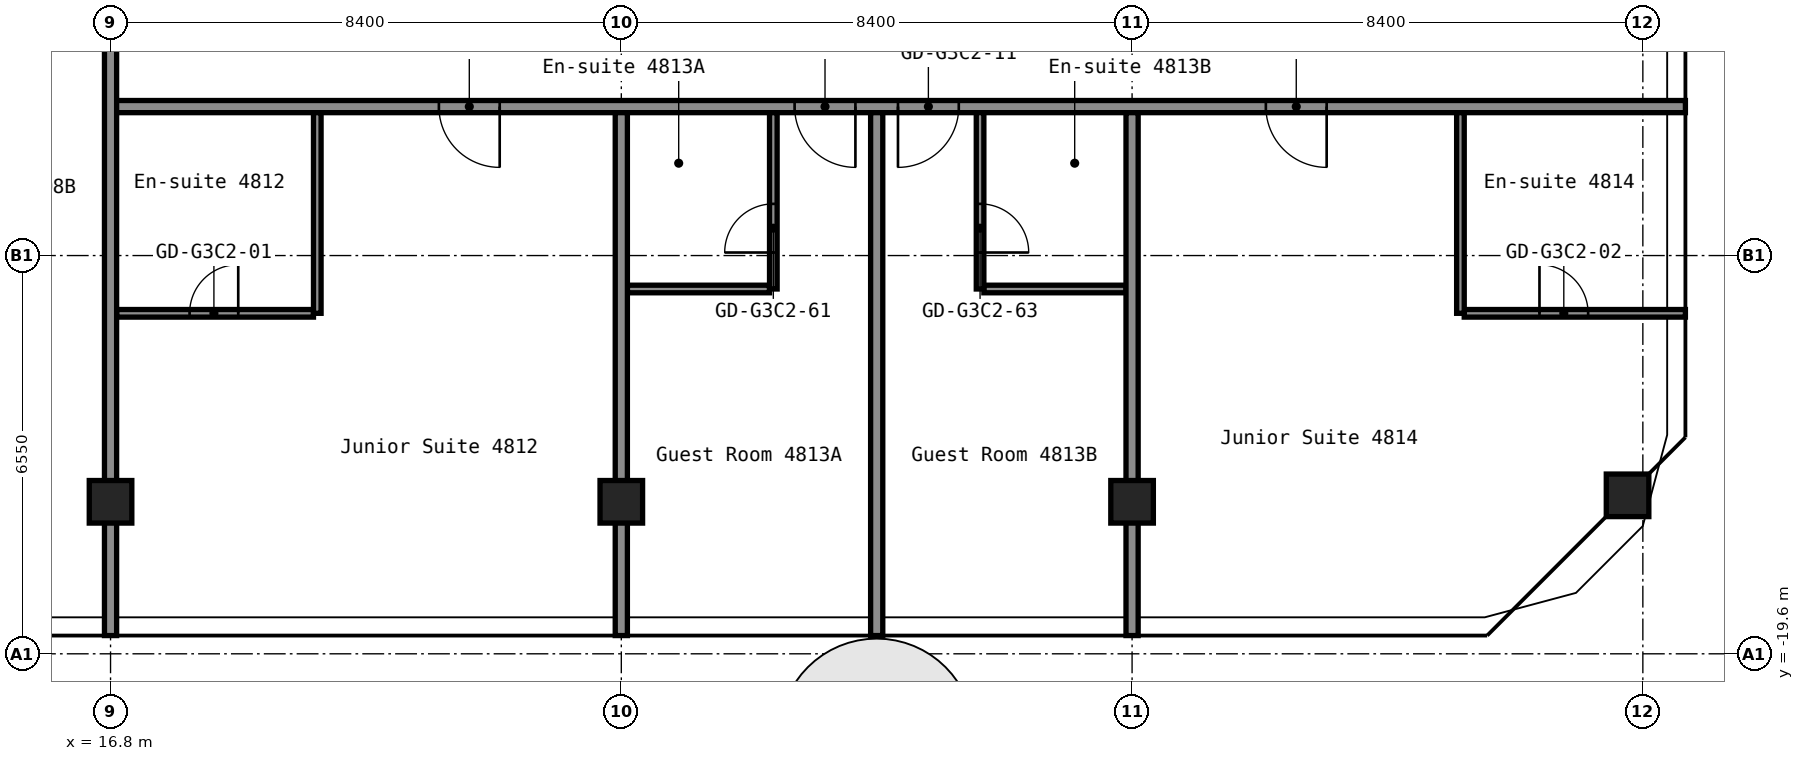
"""IFC4 building model, lengths in metres.
Left out: names, types, materials, properties, quantities, classifications, styles, units other than length and angle.
Written with IfcOpenShell. Run it as: python <this file> out.ifc"""

import sys

from ifc_helpers import new_model, si_unit, direction, frame, frame_2d, origin, origin_2d, place, context, subcontext, project, spatial, rectangle, hollow_rectangle, extrude, element, fill, save


model = new_model("IFC4")
c1 = context("Model", 3, precision=1e-05, world=origin(), true_north=direction((0.0, 1.0)))
c2 = subcontext(c1, "Body", "Model", "MODEL_VIEW")
j1 = project(units=[si_unit("LENGTHUNIT", "METRE"), si_unit("PLANEANGLEUNIT", "RADIAN")], contexts=[c1])
p1 = place(None, origin())
s1 = spatial("IfcSite", under=j1, at=p1, CompositionType="ELEMENT")
p2 = place(p1, origin())
s2 = spatial("IfcBuilding", under=s1, at=p2, CompositionType="ELEMENT")
p3 = place(p2, frame((0.0, 0.0, 169.4)))
s3 = spatial("IfcBuildingStorey", under=s2, at=p3, CompositionType="ELEMENT", Elevation=169.4)
for number, where, z_axis, x_axis in (
    (1, (16.8, -17.1, 0.0), (0.0, 0.0, 1.0), (1.0, 0.0, 0.0)),
    (2, (25.2, -17.1, 0.0), (0.0, 0.0, 1.0), (1.0, 0.0, 0.0)),
    (3, (33.6, -17.1, 0.0), (0.0, 0.0, 1.0), (1.0, 0.0, 0.0)),
    (4, (41.749, -16.994, 0.0), (0.0, 0.0, 1.0), (1.0, 0.0, 0.0)),
):
    element("IfcColumn", number, at=place(p3, frame(where, z_axis=z_axis, x_axis=x_axis)), inside=s3, PredefinedType="COLUMN", context=c2, shape_type="SweptSolid", body=[
        extrude(hollow_rectangle(XDim=0.7, YDim=0.7, WallThickness=0.028, at=origin_2d()), origin(), (0.0, 0.0, 1.0), 2.75),
    ])
p4 = place(p3, frame((16.9, -14.0, 0.0), z_axis=(0.0, 0.0, 1.0), x_axis=(1.0, 0.0, 0.0)))
e5 = element("IfcWall", 5, at=p4, inside=s3, PredefinedType="PARTITIONING", context=c2, shape_type="SweptSolid", body=[
    extrude(rectangle(XDim=3.238, YDim=0.125, at=frame_2d((1.619, 0.0))), origin(), (0.0, 0.0, 1.0), 2.75),
])
p5 = place(p4, frame((1.2, 0.0, 0.0)))
e6 = element("IfcOpeningElement", 6, at=p5, cuts=e5, PredefinedType="OPENING", context=c2, shape_type="SweptSolid", body=[
    extrude(rectangle(XDim=0.8, YDim=2.1, at=frame_2d((0.4, 1.05))), frame((0.0, 0.073, 0.0), z_axis=(0.0, -1.0, 0.0), x_axis=(1.0, 0.0, 0.0)), (0.0, 0.0, 1.0), 0.145),
])
p6 = place(p3, frame((39.062, -14.0, 0.0), z_axis=(0.0, 0.0, 1.0), x_axis=(1.0, 0.0, 0.0)))
e7 = element("IfcWall", 7, at=p6, inside=s3, PredefinedType="PARTITIONING", context=c2, shape_type="SweptSolid", body=[
    extrude(rectangle(XDim=3.637, YDim=0.125, at=frame_2d((1.819, 0.0))), origin(), (0.0, 0.0, 1.0), 2.75),
])
p7 = place(p6, frame((1.238, 0.0, 0.0)))
e8 = element("IfcOpeningElement", 8, at=p7, cuts=e7, PredefinedType="OPENING", context=c2, shape_type="SweptSolid", body=[
    extrude(rectangle(XDim=0.8, YDim=2.1, at=frame_2d((0.4, 1.05))), frame((0.0, 0.073, 0.0), z_axis=(0.0, -1.0, 0.0), x_axis=(1.0, 0.0, 0.0)), (0.0, 0.0, 1.0), 0.145),
])
for number, where, z_axis, x_axis in (
    (9, (25.3, -13.6, 0.0), (0.0, 0.0, 1.0), (1.0, 0.0, 0.0)),
    (10, (31.163, -13.6, 0.0), (0.0, 0.0, 1.0), (1.0, 0.0, 0.0)),
):
    element("IfcWall", number, at=place(p3, frame(where, z_axis=z_axis, x_axis=x_axis)), inside=s3, PredefinedType="PARTITIONING", context=c2, shape_type="SweptSolid", body=[
        extrude(rectangle(XDim=2.337, YDim=0.125, at=frame_2d((1.169, 0.0))), origin(), (0.0, 0.0, 1.0), 2.75),
    ])
p8 = place(p3, frame((16.8, -10.6, 0.0), z_axis=(0.0, 0.0, 1.0), x_axis=(1.0, 0.0, 0.0)))
e11 = element("IfcWall", 11, at=p8, inside=s3, PredefinedType="PARTITIONING", context=c2, shape_type="SweptSolid", body=[
    extrude(rectangle(XDim=25.9, YDim=0.2, at=frame_2d((12.95, 0.0))), origin(), (0.0, 0.0, 1.0), 2.75),
])
p9 = place(p8, frame((5.4, 0.0, 0.0)))
e12 = element("IfcOpeningElement", 12, at=p9, cuts=e11, PredefinedType="OPENING", context=c2, shape_type="SweptSolid", body=[
    extrude(rectangle(XDim=1.0, YDim=2.1, at=frame_2d((0.5, 1.05))), frame((0.0, 0.11, 0.0), z_axis=(0.0, -1.0, 0.0), x_axis=(1.0, 0.0, 0.0)), (0.0, 0.0, 1.0), 0.22),
])
p10 = place(p8, frame((11.25, 0.0, 0.0)))
e13 = element("IfcOpeningElement", 13, at=p10, cuts=e11, PredefinedType="OPENING", context=c2, shape_type="SweptSolid", body=[
    extrude(rectangle(XDim=1.0, YDim=2.1, at=frame_2d((0.5, 1.05))), frame((0.0, 0.11, 0.0), z_axis=(0.0, -1.0, 0.0), x_axis=(1.0, 0.0, 0.0)), (0.0, 0.0, 1.0), 0.22),
])
p11 = place(p8, frame((12.95, 0.0, 0.0)))
e14 = element("IfcOpeningElement", 14, at=p11, cuts=e11, PredefinedType="OPENING", context=c2, shape_type="SweptSolid", body=[
    extrude(rectangle(XDim=1.0, YDim=2.1, at=frame_2d((0.5, 1.05))), frame((0.0, 0.11, 0.0), z_axis=(0.0, -1.0, 0.0), x_axis=(1.0, 0.0, 0.0)), (0.0, 0.0, 1.0), 0.22),
])
p12 = place(p8, frame((19.0, 0.0, 0.0)))
e15 = element("IfcOpeningElement", 15, at=p12, cuts=e11, PredefinedType="OPENING", context=c2, shape_type="SweptSolid", body=[
    extrude(rectangle(XDim=1.0, YDim=2.1, at=frame_2d((0.5, 1.05))), frame((0.0, 0.11, 0.0), z_axis=(0.0, -1.0, 0.0), x_axis=(1.0, 0.0, 0.0)), (0.0, 0.0, 1.0), 0.22),
])
p13 = place(p3, frame((16.8, -19.3, 0.0), z_axis=(0.0, 0.0, 1.0), x_axis=(0.0, 1.0, 0.0)))
e16 = element("IfcWall", 16, at=p13, inside=s3, PredefinedType="PARTITIONING", context=c2, shape_type="SweptSolid", body=[
    extrude(rectangle(XDim=10.91, YDim=0.2, at=frame_2d((5.455, 0.0))), origin(), (0.0, 0.0, 1.0), 2.75),
])
p14 = place(p3, frame((20.2, -14.0, 0.0), z_axis=(0.0, 0.0, 1.0), x_axis=(0.0, 1.0, 0.0)))
e17 = element("IfcWall", 17, at=p14, inside=s3, PredefinedType="PARTITIONING", context=c2, shape_type="SweptSolid", body=[
    extrude(rectangle(XDim=3.3, YDim=0.125, at=frame_2d((1.65, 0.0))), origin(), (0.0, 0.0, 1.0), 2.75),
])
p15 = place(p3, frame((25.2, -19.3, 0.0), z_axis=(0.0, 0.0, 1.0), x_axis=(0.0, 1.0, 0.0)))
e18 = element("IfcWall", 18, at=p15, inside=s3, PredefinedType="PARTITIONING", context=c2, shape_type="SweptSolid", body=[
    extrude(rectangle(XDim=8.6, YDim=0.2, at=frame_2d((4.3, 0.0))), origin(), (0.0, 0.0, 1.0), 2.75),
])
p16 = place(p3, frame((27.7, -13.6, 0.0), z_axis=(0.0, 0.0, 1.0), x_axis=(0.0, 1.0, 0.0)))
e19 = element("IfcWall", 19, at=p16, inside=s3, PredefinedType="PARTITIONING", context=c2, shape_type="SweptSolid", body=[
    extrude(rectangle(XDim=2.9, YDim=0.125, at=frame_2d((1.45, 0.0))), origin(), (0.0, 0.0, 1.0), 2.75),
])
p17 = place(p16, frame((0.6, 0.0, 0.0)))
e20 = element("IfcOpeningElement", 20, at=p17, cuts=e19, PredefinedType="OPENING", context=c2, shape_type="SweptSolid", body=[
    extrude(rectangle(XDim=0.8, YDim=2.1, at=frame_2d((0.4, 1.05))), frame((0.0, 0.073, 0.0), z_axis=(0.0, -1.0, 0.0), x_axis=(1.0, 0.0, 0.0)), (0.0, 0.0, 1.0), 0.145),
])
p18 = place(p3, frame((29.4, -19.3, 0.0), z_axis=(0.0, 0.0, 1.0), x_axis=(0.0, 1.0, 0.0)))
e21 = element("IfcWall", 21, at=p18, inside=s3, PredefinedType="PARTITIONING", context=c2, shape_type="SweptSolid", body=[
    extrude(rectangle(XDim=8.6, YDim=0.2, at=frame_2d((4.3, 0.0))), origin(), (0.0, 0.0, 1.0), 2.75),
])
p19 = place(p3, frame((31.1, -13.6, 0.0), z_axis=(0.0, 0.0, 1.0), x_axis=(0.0, 1.0, 0.0)))
e22 = element("IfcWall", 22, at=p19, inside=s3, PredefinedType="PARTITIONING", context=c2, shape_type="SweptSolid", body=[
    extrude(rectangle(XDim=2.9, YDim=0.125, at=frame_2d((1.45, 0.0))), origin(), (0.0, 0.0, 1.0), 2.75),
])
p20 = place(p19, frame((0.6, 0.0, 0.0)))
e23 = element("IfcOpeningElement", 23, at=p20, cuts=e22, PredefinedType="OPENING", context=c2, shape_type="SweptSolid", body=[
    extrude(rectangle(XDim=0.8, YDim=2.1, at=frame_2d((0.4, 1.05))), frame((0.0, 0.073, 0.0), z_axis=(0.0, -1.0, 0.0), x_axis=(1.0, 0.0, 0.0)), (0.0, 0.0, 1.0), 0.145),
])
p21 = place(p3, frame((33.6, -19.3, 0.0), z_axis=(0.0, 0.0, 1.0), x_axis=(0.0, 1.0, 0.0)))
e24 = element("IfcWall", 24, at=p21, inside=s3, PredefinedType="PARTITIONING", context=c2, shape_type="SweptSolid", body=[
    extrude(rectangle(XDim=8.6, YDim=0.2, at=frame_2d((4.3, 0.0))), origin(), (0.0, 0.0, 1.0), 2.75),
])
p22 = place(p3, frame((39.0, -14.0, 0.0), z_axis=(0.0, 0.0, 1.0), x_axis=(0.0, 1.0, 0.0)))
e25 = element("IfcWall", 25, at=p22, inside=s3, PredefinedType="PARTITIONING", context=c2, shape_type="SweptSolid", body=[
    extrude(rectangle(XDim=3.3, YDim=0.125, at=frame_2d((1.65, 0.0))), origin(), (0.0, 0.0, 1.0), 2.75),
])
p23 = place(p5, origin())
e26 = element("IfcDoor", 26, at=p23, inside=s3, OperationType="SINGLE_SWING_LEFT", PredefinedType="DOOR", context=c2, shape_type="SweptSolid", body=[
    extrude(rectangle(XDim=0.8, YDim=2.1, at=frame_2d((0.4, 1.05))), frame((0.0, 0.025, 0.0), z_axis=(0.0, -1.0, 0.0), x_axis=(1.0, 0.0, 0.0)), (0.0, 0.0, 1.0), 0.05),
])
fill(e6, e26)
p24 = place(p7, origin())
e27 = element("IfcDoor", 27, at=p24, inside=s3, OperationType="SINGLE_SWING_RIGHT", PredefinedType="DOOR", context=c2, shape_type="SweptSolid", body=[
    extrude(rectangle(XDim=0.8, YDim=2.1, at=frame_2d((0.4, 1.05))), frame((0.0, 0.025, 0.0), z_axis=(0.0, -1.0, 0.0), x_axis=(1.0, 0.0, 0.0)), (0.0, 0.0, 1.0), 0.05),
])
fill(e8, e27)
p25 = place(p9, origin())
e28 = element("IfcDoor", 28, at=p25, inside=s3, OperationType="SINGLE_SWING_RIGHT", PredefinedType="DOOR", context=c2, shape_type="SweptSolid", body=[
    extrude(rectangle(XDim=1.0, YDim=2.1, at=frame_2d((0.5, 1.05))), frame((0.0, 0.025, 0.0), z_axis=(0.0, -1.0, 0.0), x_axis=(1.0, 0.0, 0.0)), (0.0, 0.0, 1.0), 0.05),
])
fill(e12, e28)
p26 = place(p10, origin())
e29 = element("IfcDoor", 29, at=p26, inside=s3, OperationType="SINGLE_SWING_RIGHT", PredefinedType="DOOR", context=c2, shape_type="SweptSolid", body=[
    extrude(rectangle(XDim=1.0, YDim=2.1, at=frame_2d((0.5, 1.05))), frame((0.0, 0.025, 0.0), z_axis=(0.0, -1.0, 0.0), x_axis=(1.0, 0.0, 0.0)), (0.0, 0.0, 1.0), 0.05),
])
fill(e13, e29)
p27 = place(p11, origin())
e30 = element("IfcDoor", 30, at=p27, inside=s3, OperationType="SINGLE_SWING_LEFT", PredefinedType="DOOR", context=c2, shape_type="SweptSolid", body=[
    extrude(rectangle(XDim=1.0, YDim=2.1, at=frame_2d((0.5, 1.05))), frame((0.0, 0.025, 0.0), z_axis=(0.0, -1.0, 0.0), x_axis=(1.0, 0.0, 0.0)), (0.0, 0.0, 1.0), 0.05),
])
fill(e14, e30)
p28 = place(p12, origin())
e31 = element("IfcDoor", 31, at=p28, inside=s3, OperationType="SINGLE_SWING_RIGHT", PredefinedType="DOOR", context=c2, shape_type="SweptSolid", body=[
    extrude(rectangle(XDim=1.0, YDim=2.1, at=frame_2d((0.5, 1.05))), frame((0.0, 0.025, 0.0), z_axis=(0.0, -1.0, 0.0), x_axis=(1.0, 0.0, 0.0)), (0.0, 0.0, 1.0), 0.05),
])
fill(e15, e31)
p29 = place(p17, origin())
e32 = element("IfcDoor", 32, at=p29, inside=s3, OperationType="SINGLE_SWING_RIGHT", PredefinedType="DOOR", context=c2, shape_type="SweptSolid", body=[
    extrude(rectangle(XDim=0.8, YDim=2.1, at=frame_2d((0.4, 1.05))), frame((0.0, 0.025, 0.0), z_axis=(0.0, -1.0, 0.0), x_axis=(1.0, 0.0, 0.0)), (0.0, 0.0, 1.0), 0.05),
])
fill(e20, e32)
p30 = place(p20, origin())
e33 = element("IfcDoor", 33, at=p30, inside=s3, OperationType="SINGLE_SWING_LEFT", PredefinedType="DOOR", context=c2, shape_type="SweptSolid", body=[
    extrude(rectangle(XDim=0.8, YDim=2.1, at=frame_2d((0.4, 1.05))), frame((0.0, 0.025, 0.0), z_axis=(0.0, -1.0, 0.0), x_axis=(1.0, 0.0, 0.0)), (0.0, 0.0, 1.0), 0.05),
])
fill(e23, e33)
save(model, sys.argv[1])
